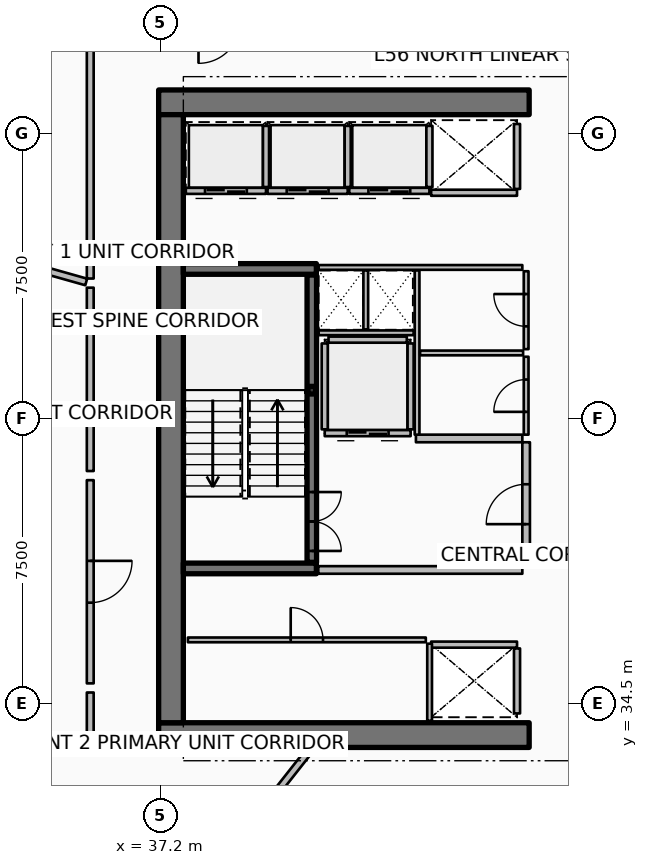
"""IFC4 building model, lengths in metres.
Left out: names, types, materials, properties, quantities, classifications, styles, units other than length and angle.
Written with IfcOpenShell. Run it as: python <this file> out.ifc"""

import sys

from ifc_helpers import new_model, si_unit, direction, frame, frame_2d, origin, origin_2d, place, context, subcontext, project, spatial, rectangle, hollow_rectangle, extrude, element, fill, save


model = new_model("IFC4")
c1 = context("Model", 3, precision=1e-05, world=origin(), true_north=direction((0.0, 1.0)))
c2 = subcontext(c1, "Body", "Model", "MODEL_VIEW")
j1 = project(units=[si_unit("LENGTHUNIT", "METRE"), si_unit("PLANEANGLEUNIT", "RADIAN")], contexts=[c1])
p1 = place(None, origin())
s1 = spatial("IfcSite", under=j1, at=p1, CompositionType="ELEMENT")
p2 = place(p1, origin())
s2 = spatial("IfcBuilding", under=s1, at=p2, CompositionType="ELEMENT")
p3 = place(p2, frame((0.0, 0.0, 221.55)))
s3 = spatial("IfcBuildingStorey", under=s2, at=p3, CompositionType="ELEMENT", Elevation=221.55)
for number, where, z_axis, x_axis in (
    (1, (37.15, 33.675, 0.0), (0.0, 0.0, 1.0), (1.0, 0.0, 0.0)),
    (2, (37.15, 50.325, 0.0), (0.0, 0.0, 1.0), (1.0, 0.0, 0.0)),
):
    element("IfcWall", number, at=place(p3, frame(where, z_axis=z_axis, x_axis=x_axis)), inside=s3, PredefinedType="SHEAR", context=c2, shape_type="SweptSolid", body=[
        extrude(rectangle(XDim=9.75, YDim=0.65, at=frame_2d((4.875, 0.0))), origin(), (0.0, 0.0, 1.0), 3.75),
    ])
p4 = place(p3, frame((37.475, 34.0, 0.0), z_axis=(0.0, 0.0, 1.0), x_axis=(0.0, 1.0, 0.0)))
e3 = element("IfcWall", 3, at=p4, inside=s3, PredefinedType="SHEAR", context=c2, shape_type="SweptSolid", body=[
    extrude(rectangle(XDim=16.0, YDim=0.65, at=frame_2d((8.0, 0.0))), origin(), (0.0, 0.0, 1.0), 3.75),
])
for number, where, z_axis, x_axis in (
    (4, (37.8, 38.06, 0.0), (0.0, 0.0, 1.0), (1.0, 0.0, 0.0)),
    (5, (37.8, 45.94, 0.0), (0.0, 0.0, 1.0), (1.0, 0.0, 0.0)),
):
    element("IfcWall", number, at=place(p3, frame(where, z_axis=z_axis, x_axis=x_axis)), inside=s3, PredefinedType="SHEAR", context=c2, shape_type="SweptSolid", body=[
        extrude(rectangle(XDim=3.5, YDim=0.28, at=frame_2d((1.75, 0.0))), origin(), (0.0, 0.0, 1.0), 3.75),
    ])
p5 = place(p3, frame((41.18, 42.75, 0.0), z_axis=(0.0, 0.0, 1.0), x_axis=(1.0, 0.0, 0.0)))
e6 = element("IfcColumn", 6, at=p5, inside=s3, PredefinedType="COLUMN", context=c2, shape_type="SweptSolid", body=[
    extrude(hollow_rectangle(XDim=0.2, YDim=0.2, WallThickness=0.01, InnerFilletRadius=0.01, OuterFilletRadius=0.02, at=origin_2d()), origin(), (0.0, 0.0, 1.0), 1.67),
])
p6 = place(p3, frame((41.18, 38.22, 0.0), z_axis=(0.0, 0.0, 1.0), x_axis=(0.0, 1.0, 0.0)))
e7 = element("IfcWall", 7, at=p6, inside=s3, PredefinedType="SOLIDWALL", context=c2, shape_type="SweptSolid", body=[
    extrude(rectangle(XDim=7.56, YDim=0.25, at=frame_2d((3.78, 0.0))), origin(), (0.0, 0.0, 1.0), 3.47),
])
p7 = place(p6, frame((0.3, 0.0, 0.0)))
e8 = element("IfcOpeningElement", 8, at=p7, cuts=e7, PredefinedType="OPENING", context=c2, shape_type="SweptSolid", body=[
    extrude(rectangle(XDim=1.55, YDim=2.15, at=frame_2d((0.775, 1.075))), frame((0.0, 0.135, 0.0), z_axis=(0.0, -1.0, 0.0), x_axis=(1.0, 0.0, 0.0)), (0.0, 0.0, 1.0), 0.27),
])
p8 = place(p3, frame((39.975, 47.995, 0.0), z_axis=(0.0, 0.0, 1.0), x_axis=(-1.0, 0.0, 0.0)))
e9 = element("IfcWall", 9, at=p8, inside=s3, PredefinedType="PARTITIONING", context=c2, shape_type="SweptSolid", body=[
    extrude(rectangle(XDim=2.11, YDim=0.16, at=frame_2d((1.055, 0.0))), origin(), (0.0, 0.0, 1.0), 3.47),
])
p9 = place(p8, frame((0.505, 0.0, 0.0)))
e10 = element("IfcOpeningElement", 10, at=p9, cuts=e9, PredefinedType="OPENING", context=c2, shape_type="SweptSolid", body=[
    extrude(rectangle(XDim=1.1, YDim=2.1, at=frame_2d((0.55, 1.05))), frame((0.0, 0.09, 0.0), z_axis=(0.0, -1.0, 0.0), x_axis=(1.0, 0.0, 0.0)), (0.0, 0.0, 1.0), 0.18),
])
p10 = place(p3, frame((39.975, 48.095, 0.0), z_axis=(0.0, 0.0, 1.0), x_axis=(0.0, 1.0, 0.0)))
e11 = element("IfcWall", 11, at=p10, inside=s3, PredefinedType="PARTITIONING", context=c2, shape_type="SweptSolid", body=[
    extrude(rectangle(XDim=1.61, YDim=0.16, at=frame_2d((0.805, 0.0))), origin(), (0.0, 0.0, 1.0), 3.47),
])
p11 = place(p3, frame((42.125, 47.995, 0.0), z_axis=(0.0, 0.0, 1.0), x_axis=(-1.0, 0.0, 0.0)))
e12 = element("IfcWall", 12, at=p11, inside=s3, PredefinedType="PARTITIONING", context=c2, shape_type="SweptSolid", body=[
    extrude(rectangle(XDim=2.11, YDim=0.16, at=frame_2d((1.055, 0.0))), origin(), (0.0, 0.0, 1.0), 3.47),
])
p12 = place(p11, frame((0.505, 0.0, 0.0)))
e13 = element("IfcOpeningElement", 13, at=p12, cuts=e12, PredefinedType="OPENING", context=c2, shape_type="SweptSolid", body=[
    extrude(rectangle(XDim=1.1, YDim=2.1, at=frame_2d((0.55, 1.05))), frame((0.0, 0.09, 0.0), z_axis=(0.0, -1.0, 0.0), x_axis=(1.0, 0.0, 0.0)), (0.0, 0.0, 1.0), 0.18),
])
p13 = place(p3, frame((42.125, 48.095, 0.0), z_axis=(0.0, 0.0, 1.0), x_axis=(0.0, 1.0, 0.0)))
e14 = element("IfcWall", 14, at=p13, inside=s3, PredefinedType="PARTITIONING", context=c2, shape_type="SweptSolid", body=[
    extrude(rectangle(XDim=1.61, YDim=0.16, at=frame_2d((0.805, 0.0))), origin(), (0.0, 0.0, 1.0), 3.47),
])
p14 = place(p3, frame((44.275, 47.995, 0.0), z_axis=(0.0, 0.0, 1.0), x_axis=(-1.0, 0.0, 0.0)))
e15 = element("IfcWall", 15, at=p14, inside=s3, PredefinedType="PARTITIONING", context=c2, shape_type="SweptSolid", body=[
    extrude(rectangle(XDim=2.11, YDim=0.16, at=frame_2d((1.055, 0.0))), origin(), (0.0, 0.0, 1.0), 3.47),
])
p15 = place(p14, frame((0.505, 0.0, 0.0)))
e16 = element("IfcOpeningElement", 16, at=p15, cuts=e15, PredefinedType="OPENING", context=c2, shape_type="SweptSolid", body=[
    extrude(rectangle(XDim=1.1, YDim=2.1, at=frame_2d((0.55, 1.05))), frame((0.0, 0.09, 0.0), z_axis=(0.0, -1.0, 0.0), x_axis=(1.0, 0.0, 0.0)), (0.0, 0.0, 1.0), 0.18),
])
p16 = place(p3, frame((44.275, 48.095, 0.0), z_axis=(0.0, 0.0, 1.0), x_axis=(0.0, 1.0, 0.0)))
e17 = element("IfcWall", 17, at=p16, inside=s3, PredefinedType="PARTITIONING", context=c2, shape_type="SweptSolid", body=[
    extrude(rectangle(XDim=1.61, YDim=0.16, at=frame_2d((0.805, 0.0))), origin(), (0.0, 0.0, 1.0), 3.47),
])
p17 = place(p3, frame((46.58, 47.945, 0.0), z_axis=(0.0, 0.0, 1.0), x_axis=(-1.0, 0.0, 0.0)))
e18 = element("IfcWall", 18, at=p17, inside=s3, PredefinedType="PARTITIONING", context=c2, shape_type="SweptSolid", body=[
    extrude(rectangle(XDim=2.26, YDim=0.16, at=frame_2d((1.13, 0.0))), origin(), (0.0, 0.0, 1.0), 3.47),
])
p18 = place(p3, frame((46.58, 48.045, 0.0), z_axis=(0.0, 0.0, 1.0), x_axis=(0.0, 1.0, 0.0)))
e19 = element("IfcWall", 19, at=p18, inside=s3, PredefinedType="PARTITIONING", context=c2, shape_type="SweptSolid", body=[
    extrude(rectangle(XDim=1.71, YDim=0.16, at=frame_2d((0.855, 0.0))), origin(), (0.0, 0.0, 1.0), 3.47),
])
p19 = place(p3, frame((44.32, 36.055, 0.0), z_axis=(0.0, 0.0, 1.0), x_axis=(1.0, 0.0, 0.0)))
e20 = element("IfcWall", 20, at=p19, inside=s3, PredefinedType="PARTITIONING", context=c2, shape_type="SweptSolid", body=[
    extrude(rectangle(XDim=2.26, YDim=0.16, at=frame_2d((1.13, 0.0))), origin(), (0.0, 0.0, 1.0), 3.47),
])
p20 = place(p3, frame((46.58, 34.245, 0.0), z_axis=(0.0, 0.0, 1.0), x_axis=(0.0, 1.0, 0.0)))
e21 = element("IfcWall", 21, at=p20, inside=s3, PredefinedType="PARTITIONING", context=c2, shape_type="SweptSolid", body=[
    extrude(rectangle(XDim=1.71, YDim=0.16, at=frame_2d((0.855, 0.0))), origin(), (0.0, 0.0, 1.0), 3.47),
])
p21 = place(p3, frame((43.78, 41.62, 0.0), z_axis=(0.0, 0.0, 1.0), x_axis=(-1.0, 0.0, 0.0)))
e22 = element("IfcWall", 22, at=p21, inside=s3, PredefinedType="PARTITIONING", context=c2, shape_type="SweptSolid", body=[
    extrude(rectangle(XDim=2.26, YDim=0.16, at=frame_2d((1.13, 0.0))), origin(), (0.0, 0.0, 1.0), 3.47),
])
p22 = place(p21, frame((0.58, 0.0, 0.0)))
e23 = element("IfcOpeningElement", 23, at=p22, cuts=e22, PredefinedType="OPENING", context=c2, shape_type="SweptSolid", body=[
    extrude(rectangle(XDim=1.1, YDim=2.1, at=frame_2d((0.55, 1.05))), frame((0.0, 0.09, 0.0), z_axis=(0.0, -1.0, 0.0), x_axis=(1.0, 0.0, 0.0)), (0.0, 0.0, 1.0), 0.18),
])
for number, where, z_axis, x_axis in (
    (24, (43.78, 41.72, 0.0), (0.0, 0.0, 1.0), (0.0, 1.0, 0.0)),
    (25, (41.52, 41.72, 0.0), (0.0, 0.0, 1.0), (0.0, 1.0, 0.0)),
):
    element("IfcWall", number, at=place(p3, frame(where, z_axis=z_axis, x_axis=x_axis)), inside=s3, PredefinedType="PARTITIONING", context=c2, shape_type="SweptSolid", body=[
        extrude(rectangle(XDim=2.26, YDim=0.16, at=frame_2d((1.13, 0.0))), origin(), (0.0, 0.0, 1.0), 3.47),
    ])
p23 = place(p3, frame((41.62, 44.08, 0.0), z_axis=(0.0, 0.0, 1.0), x_axis=(1.0, 0.0, 0.0)))
e26 = element("IfcWall", 26, at=p23, inside=s3, PredefinedType="PARTITIONING", context=c2, shape_type="SweptSolid", body=[
    extrude(rectangle(XDim=2.06, YDim=0.16, at=frame_2d((1.03, 0.0))), origin(), (0.0, 0.0, 1.0), 3.47),
])
p24 = place(p3, frame((44.28, 34.05, 0.0), z_axis=(0.0, 0.0, 1.0), x_axis=(0.0, 1.0, 0.0)))
e27 = element("IfcWall", 27, at=p24, inside=s3, PredefinedType="PARTITIONING", context=c2, shape_type="SweptSolid", body=[
    extrude(rectangle(XDim=2.03, YDim=0.125, at=frame_2d((1.015, 0.0))), origin(), (0.0, 0.0, 1.0), 2.91),
])
p25 = place(p3, frame((37.92, 36.18, 0.0), z_axis=(0.0, 0.0, 1.0), x_axis=(1.0, 0.0, 0.0)))
e28 = element("IfcWall", 28, at=p25, inside=s3, PredefinedType="PARTITIONING", context=c2, shape_type="SweptSolid", body=[
    extrude(rectangle(XDim=6.26, YDim=0.125, at=frame_2d((3.13, 0.0))), origin(), (0.0, 0.0, 1.0), 2.91),
])
p26 = place(p25, frame((2.705, 0.0, 0.0)))
e29 = element("IfcOpeningElement", 29, at=p26, cuts=e28, PredefinedType="OPENING", context=c2, shape_type="SweptSolid", body=[
    extrude(rectangle(XDim=0.85, YDim=2.06, at=frame_2d((0.425, 1.03))), frame((0.0, 0.073, 0.0), z_axis=(0.0, -1.0, 0.0), x_axis=(1.0, 0.0, 0.0)), (0.0, 0.0, 1.0), 0.145),
])
p27 = place(p3, frame((41.35, 38.02, 0.0), z_axis=(0.0, 0.0, 1.0), x_axis=(1.0, 0.0, 0.0)))
e30 = element("IfcWall", 30, at=p27, inside=s3, PredefinedType="PARTITIONING", context=c2, shape_type="SweptSolid", body=[
    extrude(rectangle(XDim=5.37, YDim=0.2, at=frame_2d((2.685, 0.0))), origin(), (0.0, 0.0, 1.0), 3.47),
])
p28 = place(p3, frame((43.92, 41.48, 0.0), z_axis=(0.0, 0.0, 1.0), x_axis=(1.0, 0.0, 0.0)))
e31 = element("IfcWall", 31, at=p28, inside=s3, PredefinedType="PARTITIONING", context=c2, shape_type="SweptSolid", body=[
    extrude(rectangle(XDim=2.8, YDim=0.2, at=frame_2d((1.4, 0.0))), origin(), (0.0, 0.0, 1.0), 3.47),
])
p29 = place(p3, frame((46.82, 38.12, 0.0), z_axis=(0.0, 0.0, 1.0), x_axis=(0.0, 1.0, 0.0)))
e32 = element("IfcWall", 32, at=p29, inside=s3, PredefinedType="PARTITIONING", context=c2, shape_type="SweptSolid", body=[
    extrude(rectangle(XDim=3.26, YDim=0.2, at=frame_2d((1.63, 0.0))), origin(), (0.0, 0.0, 1.0), 3.47),
])
p30 = place(p29, frame((1.105, 0.0, 0.0)))
e33 = element("IfcOpeningElement", 33, at=p30, cuts=e32, PredefinedType="OPENING", context=c2, shape_type="SweptSolid", body=[
    extrude(rectangle(XDim=1.05, YDim=2.1, at=frame_2d((0.525, 1.05))), frame((0.0, 0.11, 0.0), z_axis=(0.0, -1.0, 0.0), x_axis=(1.0, 0.0, 0.0)), (0.0, 0.0, 1.0), 0.22),
])
p31 = place(p3, frame((41.36, 45.98, 0.0), z_axis=(0.0, 0.0, 1.0), x_axis=(1.0, 0.0, 0.0)))
e34 = element("IfcWall", 34, at=p31, inside=s3, PredefinedType="PARTITIONING", context=c2, shape_type="SweptSolid", body=[
    extrude(rectangle(XDim=5.36, YDim=0.125, at=frame_2d((2.68, 0.0))), origin(), (0.0, 0.0, 1.0), 2.91),
])
p32 = place(p3, frame((41.36, 44.26, 0.0), z_axis=(0.0, 0.0, 1.0), x_axis=(1.0, 0.0, 0.0)))
e35 = element("IfcWall", 35, at=p32, inside=s3, PredefinedType="PARTITIONING", context=c2, shape_type="SweptSolid", body=[
    extrude(rectangle(XDim=2.5, YDim=0.125, at=frame_2d((1.25, 0.0))), origin(), (0.0, 0.0, 1.0), 2.91),
])
p33 = place(p3, frame((42.6, 44.35, 0.0), z_axis=(0.0, 0.0, 1.0), x_axis=(0.0, 1.0, 0.0)))
e36 = element("IfcWall", 36, at=p33, inside=s3, PredefinedType="PARTITIONING", context=c2, shape_type="SweptSolid", body=[
    extrude(rectangle(XDim=1.55, YDim=0.125, at=frame_2d((0.775, 0.0))), origin(), (0.0, 0.0, 1.0), 2.91),
])
p34 = place(p3, frame((43.95, 41.58, 0.0), z_axis=(0.0, 0.0, 1.0), x_axis=(0.0, 1.0, 0.0)))
e37 = element("IfcWall", 37, at=p34, inside=s3, PredefinedType="PARTITIONING", context=c2, shape_type="SweptSolid", body=[
    extrude(rectangle(XDim=4.32, YDim=0.125, at=frame_2d((2.16, 0.0))), origin(), (0.0, 0.0, 1.0), 2.91),
])
p35 = place(p3, frame((44.03, 43.73, 0.0), z_axis=(0.0, 0.0, 1.0), x_axis=(1.0, 0.0, 0.0)))
e38 = element("IfcWall", 38, at=p35, inside=s3, PredefinedType="PARTITIONING", context=c2, shape_type="SweptSolid", body=[
    extrude(rectangle(XDim=2.71, YDim=0.125, at=frame_2d((1.355, 0.0))), origin(), (0.0, 0.0, 1.0), 2.91),
])
p36 = place(p3, frame((46.82, 41.58, 0.0), z_axis=(0.0, 0.0, 1.0), x_axis=(0.0, 1.0, 0.0)))
e39 = element("IfcWall", 39, at=p36, inside=s3, PredefinedType="PARTITIONING", context=c2, shape_type="SweptSolid", body=[
    extrude(rectangle(XDim=2.05, YDim=0.125, at=frame_2d((1.025, 0.0))), origin(), (0.0, 0.0, 1.0), 2.91),
])
p37 = place(p36, frame((0.6, 0.0, 0.0)))
e40 = element("IfcOpeningElement", 40, at=p37, cuts=e39, PredefinedType="OPENING", context=c2, shape_type="SweptSolid", body=[
    extrude(rectangle(XDim=0.85, YDim=2.06, at=frame_2d((0.425, 1.03))), frame((0.0, 0.073, 0.0), z_axis=(0.0, -1.0, 0.0), x_axis=(1.0, 0.0, 0.0)), (0.0, 0.0, 1.0), 0.145),
])
p38 = place(p3, frame((46.82, 43.83, 0.0), z_axis=(0.0, 0.0, 1.0), x_axis=(0.0, 1.0, 0.0)))
e41 = element("IfcWall", 41, at=p38, inside=s3, PredefinedType="PARTITIONING", context=c2, shape_type="SweptSolid", body=[
    extrude(rectangle(XDim=2.05, YDim=0.125, at=frame_2d((1.025, 0.0))), origin(), (0.0, 0.0, 1.0), 2.91),
])
p39 = place(p38, frame((0.6, 0.0, 0.0)))
e42 = element("IfcOpeningElement", 42, at=p39, cuts=e41, PredefinedType="OPENING", context=c2, shape_type="SweptSolid", body=[
    extrude(rectangle(XDim=0.85, YDim=2.06, at=frame_2d((0.425, 1.03))), frame((0.0, 0.073, 0.0), z_axis=(0.0, -1.0, 0.0), x_axis=(1.0, 0.0, 0.0)), (0.0, 0.0, 1.0), 0.145),
])
p40 = place(p3, frame((35.244, 45.598, 0.0), z_axis=(0.0, 0.0, 1.0), x_axis=(-0.962456561262, 0.271435752405, 0.0)))
e43 = element("IfcWall", 43, at=p40, inside=s3, PredefinedType="PARTITIONING", context=c2, shape_type="SweptSolid", body=[
    extrude(rectangle(XDim=13.777, YDim=0.18, at=frame_2d((6.888, 0.0))), origin(), (0.0, 0.0, 1.0), 2.427),
])
p41 = place(p3, frame((41.113, 33.264, 0.0), z_axis=(0.0, 0.0, 1.0), x_axis=(-0.619089233189, -0.785320648748, 0.0)))
e44 = element("IfcWall", 44, at=p41, inside=s3, PredefinedType="PARTITIONING", context=c2, shape_type="SweptSolid", body=[
    extrude(rectangle(XDim=16.006, YDim=0.18, at=frame_2d((8.003, 0.0))), origin(), (0.0, 0.0, 1.0), 2.427),
])
p42 = place(p3, frame((35.35, 51.853, 0.0), z_axis=(0.0, 0.0, 1.0), x_axis=(0.0, -1.0, 0.0)))
e45 = element("IfcWall", 45, at=p42, inside=s3, PredefinedType="PARTITIONING", context=c2, shape_type="SweptSolid", body=[
    extrude(rectangle(XDim=6.165, YDim=0.18, at=frame_2d((3.083, 0.0))), origin(), (0.0, 0.0, 1.0), 2.427),
])
p43 = place(p3, frame((35.35, 40.383, 0.0), z_axis=(0.0, 0.0, 1.0), x_axis=(0.0, -1.0, 0.0)))
e46 = element("IfcWall", 46, at=p43, inside=s3, PredefinedType="PARTITIONING", context=c2, shape_type="SweptSolid", body=[
    extrude(rectangle(XDim=5.347, YDim=0.18, at=frame_2d((2.674, 0.0))), origin(), (0.0, 0.0, 1.0), 2.427),
])
p44 = place(p43, frame((2.124, 0.0, 0.0)))
e47 = element("IfcOpeningElement", 47, at=p44, cuts=e46, PredefinedType="OPENING", context=c2, shape_type="SweptSolid", body=[
    extrude(rectangle(XDim=1.1, YDim=2.1, at=frame_2d((0.55, 1.05))), frame((0.0, 0.1, 0.0), z_axis=(0.0, -1.0, 0.0), x_axis=(1.0, 0.0, 0.0)), (0.0, 0.0, 1.0), 0.2),
])
p45 = place(p3, frame((35.35, 45.448, 0.0), z_axis=(0.0, 0.0, 1.0), x_axis=(0.0, -1.0, 0.0)))
e48 = element("IfcWall", 48, at=p45, inside=s3, PredefinedType="PARTITIONING", context=c2, shape_type="SweptSolid", body=[
    extrude(rectangle(XDim=4.825, YDim=0.18, at=frame_2d((2.413, 0.0))), origin(), (0.0, 0.0, 1.0), 2.427),
])
p46 = place(p3, frame((35.35, 34.796, 0.0), z_axis=(0.0, 0.0, 1.0), x_axis=(0.0, -1.0, 0.0)))
e49 = element("IfcWall", 49, at=p46, inside=s3, PredefinedType="PARTITIONING", context=c2, shape_type="SweptSolid", body=[
    extrude(rectangle(XDim=1.326, YDim=0.18, at=frame_2d((0.663, 0.0))), origin(), (0.0, 0.0, 1.0), 2.427),
])
p47 = place(p7, origin())
e50 = element("IfcDoor", 50, at=p47, inside=s3, OperationType="DOUBLE_DOOR_SINGLE_SWING", PredefinedType="DOOR", context=c2, shape_type="SweptSolid", body=[
    extrude(rectangle(XDim=1.55, YDim=2.15, at=frame_2d((0.775, 1.075))), frame((0.0, 0.025, 0.0), z_axis=(0.0, -1.0, 0.0), x_axis=(1.0, 0.0, 0.0)), (0.0, 0.0, 1.0), 0.05),
])
fill(e8, e50)
p48 = place(p9, origin())
e51 = element("IfcDoor", 51, at=p48, inside=s3, OperationType="DOUBLE_DOOR_SLIDING", PredefinedType="DOOR", context=c2, shape_type="SweptSolid", body=[
    extrude(rectangle(XDim=1.1, YDim=2.1, at=frame_2d((0.55, 1.05))), frame((0.0, 0.025, 0.0), z_axis=(0.0, -1.0, 0.0), x_axis=(1.0, 0.0, 0.0)), (0.0, 0.0, 1.0), 0.05),
])
fill(e10, e51)
p49 = place(p12, origin())
e52 = element("IfcDoor", 52, at=p49, inside=s3, OperationType="DOUBLE_DOOR_SLIDING", PredefinedType="DOOR", context=c2, shape_type="SweptSolid", body=[
    extrude(rectangle(XDim=1.1, YDim=2.1, at=frame_2d((0.55, 1.05))), frame((0.0, 0.025, 0.0), z_axis=(0.0, -1.0, 0.0), x_axis=(1.0, 0.0, 0.0)), (0.0, 0.0, 1.0), 0.05),
])
fill(e13, e52)
p50 = place(p15, origin())
e53 = element("IfcDoor", 53, at=p50, inside=s3, OperationType="DOUBLE_DOOR_SLIDING", PredefinedType="DOOR", context=c2, shape_type="SweptSolid", body=[
    extrude(rectangle(XDim=1.1, YDim=2.1, at=frame_2d((0.55, 1.05))), frame((0.0, 0.025, 0.0), z_axis=(0.0, -1.0, 0.0), x_axis=(1.0, 0.0, 0.0)), (0.0, 0.0, 1.0), 0.05),
])
fill(e16, e53)
p51 = place(p22, origin())
e54 = element("IfcDoor", 54, at=p51, inside=s3, OperationType="DOUBLE_DOOR_SLIDING", PredefinedType="DOOR", context=c2, shape_type="SweptSolid", body=[
    extrude(rectangle(XDim=1.1, YDim=2.1, at=frame_2d((0.55, 1.05))), frame((0.0, 0.025, 0.0), z_axis=(0.0, -1.0, 0.0), x_axis=(1.0, 0.0, 0.0)), (0.0, 0.0, 1.0), 0.05),
])
fill(e23, e54)
p52 = place(p26, origin())
e55 = element("IfcDoor", 55, at=p52, inside=s3, OperationType="SINGLE_SWING_LEFT", PredefinedType="DOOR", context=c2, shape_type="SweptSolid", body=[
    extrude(rectangle(XDim=0.85, YDim=2.06, at=frame_2d((0.425, 1.03))), frame((0.0, 0.025, 0.0), z_axis=(0.0, -1.0, 0.0), x_axis=(1.0, 0.0, 0.0)), (0.0, 0.0, 1.0), 0.05),
])
fill(e29, e55)
p53 = place(p30, origin())
e56 = element("IfcDoor", 56, at=p53, inside=s3, OperationType="SINGLE_SWING_LEFT", PredefinedType="DOOR", context=c2, shape_type="SweptSolid", body=[
    extrude(rectangle(XDim=1.05, YDim=2.1, at=frame_2d((0.525, 1.05))), frame((0.0, 0.025, 0.0), z_axis=(0.0, -1.0, 0.0), x_axis=(1.0, 0.0, 0.0)), (0.0, 0.0, 1.0), 0.05),
])
fill(e33, e56)
p54 = place(p37, origin())
e57 = element("IfcDoor", 57, at=p54, inside=s3, OperationType="SINGLE_SWING_LEFT", PredefinedType="DOOR", context=c2, shape_type="SweptSolid", body=[
    extrude(rectangle(XDim=0.85, YDim=2.06, at=frame_2d((0.425, 1.03))), frame((0.0, 0.025, 0.0), z_axis=(0.0, -1.0, 0.0), x_axis=(1.0, 0.0, 0.0)), (0.0, 0.0, 1.0), 0.05),
])
fill(e40, e57)
p55 = place(p39, origin())
e58 = element("IfcDoor", 58, at=p55, inside=s3, OperationType="SINGLE_SWING_RIGHT", PredefinedType="DOOR", context=c2, shape_type="SweptSolid", body=[
    extrude(rectangle(XDim=0.85, YDim=2.06, at=frame_2d((0.425, 1.03))), frame((0.0, 0.025, 0.0), z_axis=(0.0, -1.0, 0.0), x_axis=(1.0, 0.0, 0.0)), (0.0, 0.0, 1.0), 0.05),
])
fill(e42, e58)
p56 = place(p44, origin())
e59 = element("IfcDoor", 59, at=p56, inside=s3, OperationType="SINGLE_SWING_LEFT", PredefinedType="DOOR", context=c2, shape_type="SweptSolid", body=[
    extrude(rectangle(XDim=1.1, YDim=2.1, at=frame_2d((0.55, 1.05))), frame((0.0, 0.025, 0.0), z_axis=(0.0, -1.0, 0.0), x_axis=(1.0, 0.0, 0.0)), (0.0, 0.0, 1.0), 0.05),
])
fill(e47, e59)
save(model, sys.argv[1])
